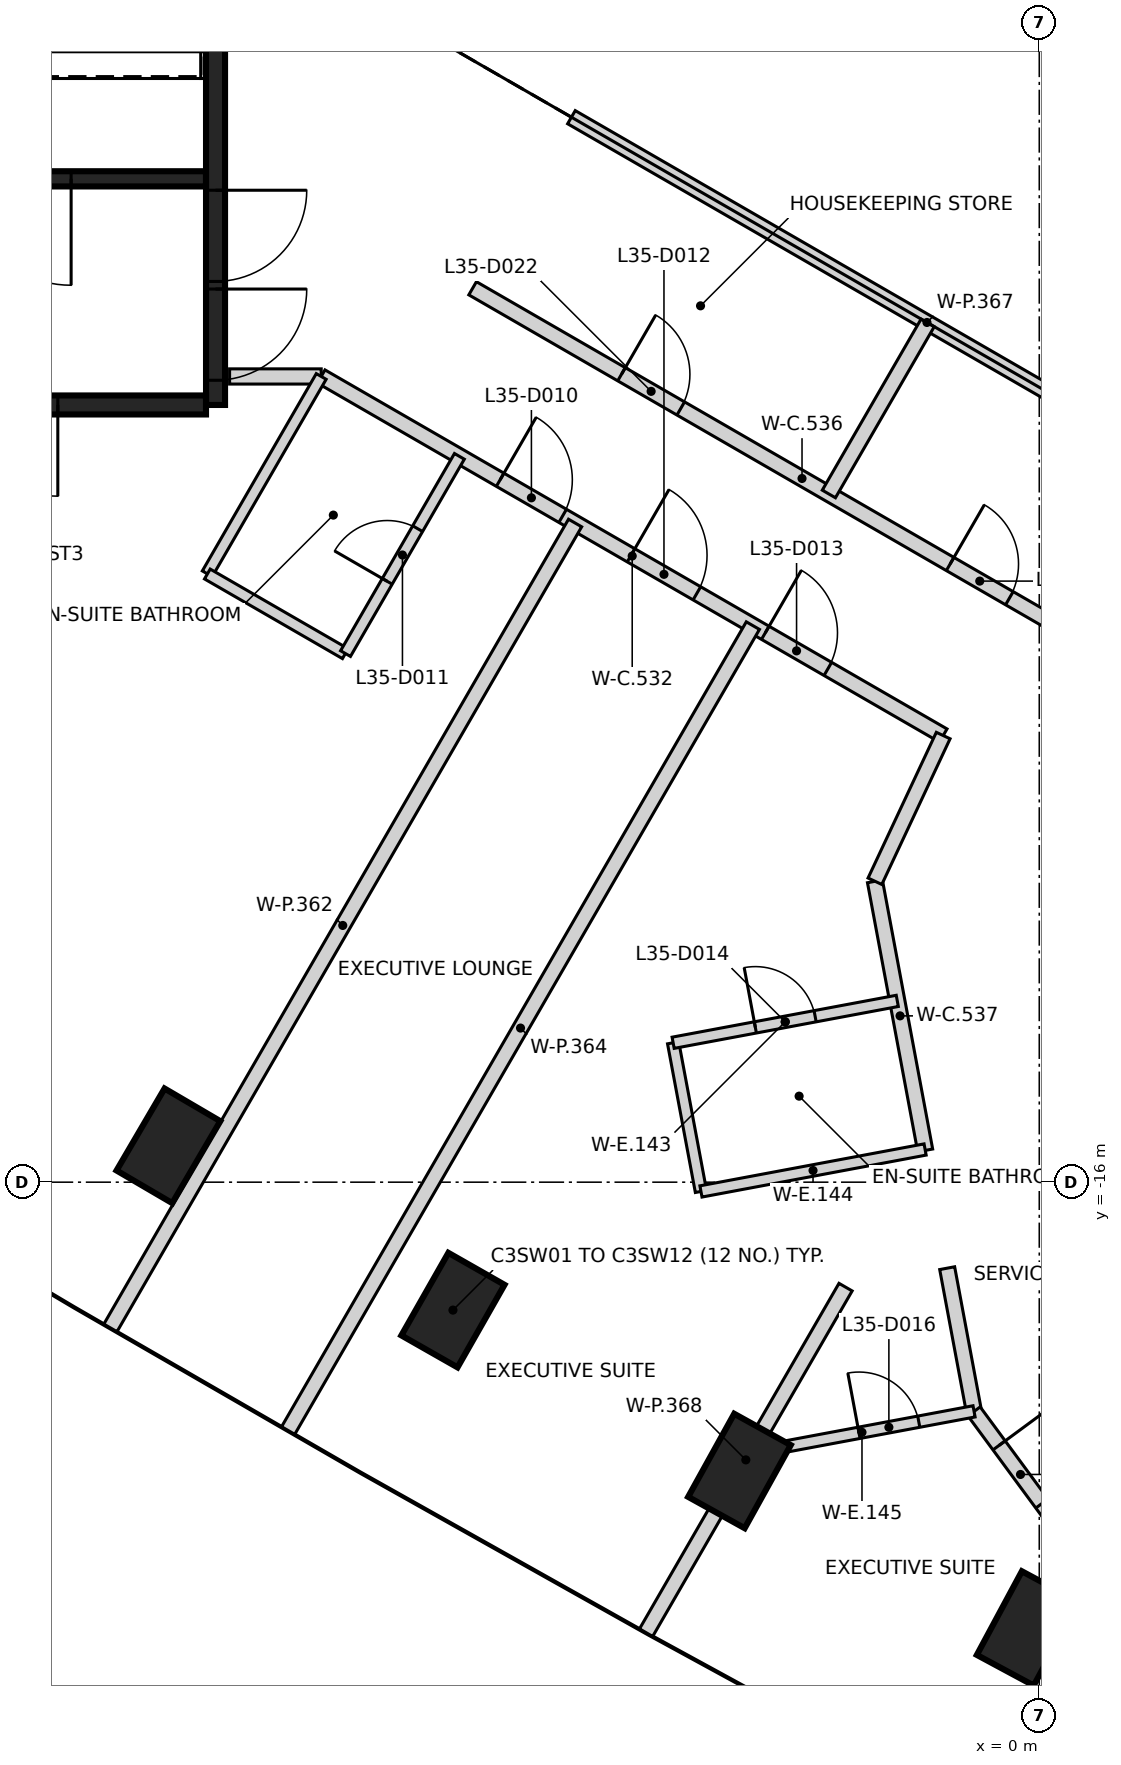
"""IFC4 building model, lengths in metres.
Left out: names, types, materials, properties, quantities, classifications, styles, units other than length and angle.
Written with IfcOpenShell. Run it as: python <this file> out.ifc"""

import sys

from ifc_helpers import new_model, si_unit, direction, frame, frame_2d, origin, origin_2d, place, context, subcontext, project, spatial, rectangle, extrude, element, fill, save


model = new_model("IFC4")
c1 = context("Model", 3, precision=1e-05, world=origin(), true_north=direction((0.0, 1.0)))
c2 = subcontext(c1, "Body", "Model", "MODEL_VIEW")
j1 = project(units=[si_unit("LENGTHUNIT", "METRE"), si_unit("PLANEANGLEUNIT", "RADIAN")], contexts=[c1])
p1 = place(None, origin())
s1 = spatial("IfcSite", under=j1, at=p1, CompositionType="ELEMENT")
p2 = place(p1, origin())
s2 = spatial("IfcBuilding", under=s1, at=p2, CompositionType="ELEMENT")
p3 = place(p2, frame((0.0, 0.0, 143.2)))
s3 = spatial("IfcBuildingStorey", under=s2, at=p3, CompositionType="ELEMENT", Elevation=143.2)
for number, where, z_axis, x_axis in (
    (1, (-11.457, -15.522, -0.4), (0.0, 0.0, 1.0), (0.505, 0.863, 0.0)),
    (2, (-7.714, -17.683, -0.4), (0.0, 0.0, 1.0), (0.495, 0.869, 0.0)),
    (3, (-3.945, -19.8, -0.4), (0.0, 0.0, 1.0), (0.485, 0.875, 0.0)),
    (4, (-0.151, -21.871, -0.4), (0.0, 0.0, 1.0), (0.474, 0.881, 0.0)),
):
    element("IfcColumn", number, at=place(p3, frame(where, z_axis=z_axis, x_axis=x_axis)), inside=s3, PredefinedType="COLUMN", context=c2, shape_type="SweptSolid", body=[
        extrude(rectangle(XDim=1.25, YDim=0.85, at=origin_2d()), origin(), (0.0, 0.0, 1.0), 3.6),
    ])
p4 = place(p3, frame((-10.837, 5.775, 0.0), z_axis=(0.0, 0.0, 1.0), x_axis=(0.0, -1.0, 0.0)))
e5 = element("IfcWall", 5, at=p4, inside=s3, PredefinedType="SHEAR", context=c2, shape_type="SweptSolid", body=[
    extrude(rectangle(XDim=11.55, YDim=0.25, at=frame_2d((5.775, 0.0))), origin(), (0.0, 0.0, 1.0), 3.2),
])
p5 = place(p4, frame((10.025, 0.0, 0.0)))
e6 = element("IfcOpeningElement", 6, at=p5, cuts=e5, PredefinedType="OPENING", context=c2, shape_type="SweptSolid", body=[
    extrude(rectangle(XDim=1.2, YDim=2.1, at=frame_2d((0.6, 1.05))), frame((0.0, 0.135, 0.0), z_axis=(0.0, -1.0, 0.0), x_axis=(1.0, 0.0, 0.0)), (0.0, 0.0, 1.0), 0.27),
])
p6 = place(p4, frame((8.725, 0.0, 0.0)))
e7 = element("IfcOpeningElement", 7, at=p6, cuts=e5, PredefinedType="OPENING", context=c2, shape_type="SweptSolid", body=[
    extrude(rectangle(XDim=1.2, YDim=2.1, at=frame_2d((0.6, 1.05))), frame((0.0, 0.135, 0.0), z_axis=(0.0, -1.0, 0.0), x_axis=(1.0, 0.0, 0.0)), (0.0, 0.0, 1.0), 0.27),
])
p7 = place(p3, frame((-10.963, -5.775, 0.0), z_axis=(0.0, 0.0, 1.0), x_axis=(-1.0, 0.0, 0.0)))
e8 = element("IfcWall", 8, at=p7, inside=s3, PredefinedType="SHEAR", context=c2, shape_type="SweptSolid", body=[
    extrude(rectangle(XDim=5.225, YDim=0.25, at=frame_2d((2.612, 0.0))), origin(), (0.0, 0.0, 1.0), 3.2),
])
p8 = place(p7, frame((1.95, 0.0, 0.0)))
e9 = element("IfcOpeningElement", 9, at=p8, cuts=e8, PredefinedType="OPENING", context=c2, shape_type="SweptSolid", body=[
    extrude(rectangle(XDim=1.2, YDim=2.1, at=frame_2d((0.6, 1.05))), frame((0.0, 0.135, 0.0), z_axis=(0.0, -1.0, 0.0), x_axis=(1.0, 0.0, 0.0)), (0.0, 0.0, 1.0), 0.27),
])
p9 = place(p3, frame((-10.963, -2.8, 0.0), z_axis=(0.0, 0.0, 1.0), x_axis=(-1.0, 0.0, 0.0)))
e10 = element("IfcWall", 10, at=p9, inside=s3, PredefinedType="SHEAR", context=c2, shape_type="SweptSolid", body=[
    extrude(rectangle(XDim=5.098, YDim=0.2, at=frame_2d((2.549, 0.0))), origin(), (0.0, 0.0, 1.0), 3.2),
])
p10 = place(p9, frame((1.774, 0.0, 0.0)))
e11 = element("IfcOpeningElement", 11, at=p10, cuts=e10, PredefinedType="OPENING", context=c2, shape_type="SweptSolid", body=[
    extrude(rectangle(XDim=1.4, YDim=2.1, at=frame_2d((0.7, 1.05))), frame((0.0, 0.11, 0.0), z_axis=(0.0, -1.0, 0.0), x_axis=(1.0, 0.0, 0.0)), (0.0, 0.0, 1.0), 0.22),
])
p11 = place(p3, frame((-10.652, -5.4, 0.0), z_axis=(0.0, 0.0, 1.0), x_axis=(1.0, 0.0, 0.0)))
e12 = element("IfcWall", 12, at=p11, inside=s3, PredefinedType="PARTITIONING", context=c2, shape_type="SweptSolid", body=[
    extrude(rectangle(XDim=1.205, YDim=0.2, at=frame_2d((0.603, 0.0))), origin(), (0.0, 0.0, 1.0), 3.2),
])
p12 = place(p3, frame((-9.447, -5.4, 0.0), z_axis=(0.0, 0.0, 1.0), x_axis=(0.866101262146, -0.49986858644, 0.0)))
e13 = element("IfcWall", 13, at=p12, inside=s3, PredefinedType="PARTITIONING", context=c2, shape_type="SweptSolid", body=[
    extrude(rectangle(XDim=9.449, YDim=0.2, at=frame_2d((4.724, 0.0))), origin(), (0.0, 0.0, 1.0), 3.2),
])
p13 = place(p12, frame((2.718, 0.0, 0.0)))
e14 = element("IfcOpeningElement", 14, at=p13, cuts=e13, PredefinedType="OPENING", context=c2, shape_type="SweptSolid", body=[
    extrude(rectangle(XDim=0.95, YDim=2.1, at=frame_2d((0.475, 1.05))), frame((0.0, 0.11, 0.0), z_axis=(0.0, -1.0, 0.0), x_axis=(1.0, 0.0, 0.0)), (0.0, 0.0, 1.0), 0.22),
])
p14 = place(p12, frame((4.707, 0.0, 0.0)))
e15 = element("IfcOpeningElement", 15, at=p14, cuts=e13, PredefinedType="OPENING", context=c2, shape_type="SweptSolid", body=[
    extrude(rectangle(XDim=1.0, YDim=2.1, at=frame_2d((0.5, 1.05))), frame((0.0, 0.11, 0.0), z_axis=(0.0, -1.0, 0.0), x_axis=(1.0, 0.0, 0.0)), (0.0, 0.0, 1.0), 0.22),
])
p15 = place(p12, frame((6.746, 0.0, 0.0)))
e16 = element("IfcOpeningElement", 16, at=p15, cuts=e13, PredefinedType="OPENING", context=c2, shape_type="SweptSolid", body=[
    extrude(rectangle(XDim=0.95, YDim=2.1, at=frame_2d((0.475, 1.05))), frame((0.0, 0.11, 0.0), z_axis=(0.0, -1.0, 0.0), x_axis=(1.0, 0.0, 0.0)), (0.0, 0.0, 1.0), 0.22),
])
p16 = place(p3, frame((-7.455, -4.24, 0.0), z_axis=(0.0, 0.0, 1.0), x_axis=(0.866015783746, -0.500016662025, 0.0)))
e17 = element("IfcWall", 17, at=p16, inside=s3, PredefinedType="PARTITIONING", context=c2, shape_type="SweptSolid", body=[
    extrude(rectangle(XDim=10.009, YDim=0.2, at=frame_2d((5.004, 0.0))), origin(), (0.0, 0.0, 1.0), 3.2),
])
p17 = place(p16, frame((2.262, 0.0, 0.0)))
e18 = element("IfcOpeningElement", 18, at=p17, cuts=e17, PredefinedType="OPENING", context=c2, shape_type="SweptSolid", body=[
    extrude(rectangle(XDim=0.9, YDim=2.1, at=frame_2d((0.45, 1.05))), frame((0.0, 0.11, 0.0), z_axis=(0.0, -1.0, 0.0), x_axis=(1.0, 0.0, 0.0)), (0.0, 0.0, 1.0), 0.22),
])
p18 = place(p16, frame((7.254, 0.0, 0.0)))
e19 = element("IfcOpeningElement", 19, at=p18, cuts=e17, PredefinedType="OPENING", context=c2, shape_type="SweptSolid", body=[
    extrude(rectangle(XDim=0.9, YDim=2.1, at=frame_2d((0.45, 1.05))), frame((0.0, 0.11, 0.0), z_axis=(0.0, -1.0, 0.0), x_axis=(1.0, 0.0, 0.0)), (0.0, 0.0, 1.0), 0.22),
])
p19 = place(p3, frame((-2.162, -12.042, 0.0), z_axis=(0.0, 0.0, 1.0), x_axis=(0.183572226488, -0.983006224631, 0.0)))
e20 = element("IfcWall", 20, at=p19, inside=s3, PredefinedType="PARTITIONING", context=c2, shape_type="SweptSolid", body=[
    extrude(rectangle(XDim=3.602, YDim=0.2, at=frame_2d((1.801, 0.0))), origin(), (0.0, 0.0, 1.0), 3.2),
])
p20 = place(p3, frame((-2.162, -12.041, 0.0), z_axis=(0.0, 0.0, 1.0), x_axis=(0.424280226728, 0.905530943264, 0.0)))
e21 = element("IfcWall", 21, at=p20, inside=s3, PredefinedType="PARTITIONING", context=c2, shape_type="SweptSolid", body=[
    extrude(rectangle(XDim=2.117, YDim=0.2, at=frame_2d((1.059, 0.0))), origin(), (0.0, 0.0, 1.0), 3.2),
])
p21 = place(p3, frame((-1.212, -17.131, 0.0), z_axis=(0.0, 0.0, 1.0), x_axis=(0.183680924698, -0.982985919483, 0.0)))
e22 = element("IfcWall", 22, at=p21, inside=s3, PredefinedType="PARTITIONING", context=c2, shape_type="SweptSolid", body=[
    extrude(rectangle(XDim=1.917, YDim=0.2, at=frame_2d((0.958, 0.0))), origin(), (0.0, 0.0, 1.0), 3.2),
])
p22 = place(p3, frame((-0.858, -19.016, 0.0), z_axis=(0.0, 0.0, 1.0), x_axis=(0.593123867414, -0.805111220829, 0.0)))
e23 = element("IfcWall", 23, at=p22, inside=s3, PredefinedType="PARTITIONING", context=c2, shape_type="SweptSolid", body=[
    extrude(rectangle(XDim=2.77, YDim=0.2, at=frame_2d((1.385, 0.0))), origin(), (0.0, 0.0, 1.0), 3.2),
])
p23 = place(p22, frame((0.555, 0.0, 0.0)))
e24 = element("IfcOpeningElement", 24, at=p23, cuts=e23, PredefinedType="OPENING", context=c2, shape_type="SweptSolid", body=[
    extrude(rectangle(XDim=0.95, YDim=2.1, at=frame_2d((0.475, 1.05))), frame((0.0, 0.11, 0.0), z_axis=(0.0, -1.0, 0.0), x_axis=(1.0, 0.0, 0.0)), (0.0, 0.0, 1.0), 0.22),
])
p24 = place(p3, frame((-12.22, -17.917, 0.0), z_axis=(0.0, 0.0, 1.0), x_axis=(0.499963860175, 0.866046268117, 0.0)))
e25 = element("IfcWall", 25, at=p24, inside=s3, PredefinedType="PARTITIONING", context=c2, shape_type="SweptSolid", body=[
    extrude(rectangle(XDim=12.227, YDim=0.2, at=frame_2d((6.114, 0.0))), origin(), (0.0, 0.0, 1.0), 2.3),
])
p25 = place(p3, frame((-9.882, -19.267, 0.0), z_axis=(0.0, 0.0, 1.0), x_axis=(0.499993811829, 0.866028976497, 0.0)))
e26 = element("IfcWall", 26, at=p25, inside=s3, PredefinedType="PARTITIONING", context=c2, shape_type="SweptSolid", body=[
    extrude(rectangle(XDim=12.227, YDim=0.2, at=frame_2d((6.114, 0.0))), origin(), (0.0, 0.0, 1.0), 2.3),
])
p26 = place(p3, frame((-6.155, -1.989, 0.0), z_axis=(0.0, 0.0, 1.0), x_axis=(0.866009062299, -0.500028303215, 0.0)))
e27 = element("IfcWall", 27, at=p26, inside=s3, PredefinedType="PARTITIONING", context=c2, shape_type="SweptSolid", body=[
    extrude(rectangle(XDim=10.802, YDim=0.2, at=frame_2d((5.401, 0.0))), origin(), (0.0, 0.0, 1.0), 2.3),
])
p27 = place(p3, frame((-5.173, -21.926, 0.0), z_axis=(0.0, 0.0, 1.0), x_axis=(0.499941227542, 0.86605933342, 0.0)))
e28 = element("IfcWall", 28, at=p27, inside=s3, PredefinedType="PARTITIONING", context=c2, shape_type="SweptSolid", body=[
    extrude(rectangle(XDim=5.249, YDim=0.2, at=frame_2d((2.625, 0.0))), origin(), (0.0, 0.0, 1.0), 3.2),
])
p28 = place(p3, frame((-2.768, -6.946, 0.0), z_axis=(0.0, 0.0, 1.0), x_axis=(0.500017832597, 0.866015107885, 0.0)))
e29 = element("IfcWall", 29, at=p28, inside=s3, PredefinedType="PARTITIONING", context=c2, shape_type="SweptSolid", body=[
    extrude(rectangle(XDim=2.6, YDim=0.2, at=frame_2d((1.3, 0.0))), origin(), (0.0, 0.0, 1.0), 2.3),
])
p29 = place(p3, frame((-0.425, -24.505, 0.0), z_axis=(0.0, 0.0, 1.0), x_axis=(0.499915194772, 0.86607436057, 0.0)))
e30 = element("IfcWall", 30, at=p29, inside=s3, PredefinedType="PARTITIONING", context=c2, shape_type="SweptSolid", body=[
    extrude(rectangle(XDim=2.997, YDim=0.2, at=frame_2d((1.499, 0.0))), origin(), (0.0, 0.0, 1.0), 2.3),
])
p30 = place(p3, frame((-10.946, -7.996, 0.0), z_axis=(0.0, 0.0, 1.0), x_axis=(0.500027927039, 0.866009279501, 0.0)))
e31 = element("IfcWall", 31, at=p30, inside=s3, PredefinedType="PARTITIONING", context=c2, shape_type="SweptSolid", body=[
    extrude(rectangle(XDim=2.998, YDim=0.15, at=frame_2d((1.499, 0.0))), origin(), (0.0, 0.0, 1.0), 3.2),
])
p31 = place(p3, frame((-10.945, -7.999, 0.0), z_axis=(0.0, 0.0, 1.0), x_axis=(0.866005190944, -0.500035008033, 0.0)))
e32 = element("IfcWall", 32, at=p31, inside=s3, PredefinedType="PARTITIONING", context=c2, shape_type="SweptSolid", body=[
    extrude(rectangle(XDim=2.096, YDim=0.15, at=frame_2d((1.048, 0.0))), origin(), (0.0, 0.0, 1.0), 3.2),
])
p32 = place(p3, frame((-9.127, -9.046, 0.0), z_axis=(0.0, 0.0, 1.0), x_axis=(0.499959910729, 0.866048548099, 0.0)))
e33 = element("IfcWall", 33, at=p32, inside=s3, PredefinedType="PARTITIONING", context=c2, shape_type="SweptSolid", body=[
    extrude(rectangle(XDim=2.996, YDim=0.15, at=frame_2d((1.498, 0.0))), origin(), (0.0, 0.0, 1.0), 3.2),
])
p33 = place(p32, frame((1.098, 0.0, 0.0)))
e34 = element("IfcOpeningElement", 34, at=p33, cuts=e33, PredefinedType="OPENING", context=c2, shape_type="SweptSolid", body=[
    extrude(rectangle(XDim=0.8, YDim=2.1, at=frame_2d((0.4, 1.05))), frame((0.0, 0.085, 0.0), z_axis=(0.0, -1.0, 0.0), x_axis=(1.0, 0.0, 0.0)), (0.0, 0.0, 1.0), 0.17),
])
p34 = place(p3, frame((-4.817, -14.166, 0.0), z_axis=(0.0, 0.0, 1.0), x_axis=(0.183903339385, -0.982944332993, 0.0)))
e35 = element("IfcWall", 35, at=p34, inside=s3, PredefinedType="PARTITIONING", context=c2, shape_type="SweptSolid", body=[
    extrude(rectangle(XDim=1.99, YDim=0.15, at=frame_2d((0.995, 0.0))), origin(), (0.0, 0.0, 1.0), 3.2),
])
p35 = place(p3, frame((-4.817, -14.166, 0.0), z_axis=(0.0, 0.0, 1.0), x_axis=(0.982987155193, 0.183674311555, 0.0)))
e36 = element("IfcWall", 36, at=p35, inside=s3, PredefinedType="PARTITIONING", context=c2, shape_type="SweptSolid", body=[
    extrude(rectangle(XDim=3.0, YDim=0.15, at=frame_2d((1.5, 0.0))), origin(), (0.0, 0.0, 1.0), 3.2),
])
p36 = place(p35, frame((1.1, 0.0, 0.0)))
e37 = element("IfcOpeningElement", 37, at=p36, cuts=e36, PredefinedType="OPENING", context=c2, shape_type="SweptSolid", body=[
    extrude(rectangle(XDim=0.8, YDim=2.1, at=frame_2d((0.4, 1.05))), frame((0.0, 0.085, 0.0), z_axis=(0.0, -1.0, 0.0), x_axis=(1.0, 0.0, 0.0)), (0.0, 0.0, 1.0), 0.17),
])
p37 = place(p3, frame((-4.451, -16.122, 0.0), z_axis=(0.0, 0.0, 1.0), x_axis=(0.982928336035, 0.18398882091, 0.0)))
e38 = element("IfcWall", 38, at=p37, inside=s3, PredefinedType="PARTITIONING", context=c2, shape_type="SweptSolid", body=[
    extrude(rectangle(XDim=3.0, YDim=0.15, at=frame_2d((1.5, 0.0))), origin(), (0.0, 0.0, 1.0), 3.2),
])
p38 = place(p3, frame((-3.807, -19.566, 0.0), z_axis=(0.0, 0.0, 1.0), x_axis=(0.982987155193, 0.183674311555, 0.0)))
e39 = element("IfcWall", 39, at=p38, inside=s3, PredefinedType="PARTITIONING", context=c2, shape_type="SweptSolid", body=[
    extrude(rectangle(XDim=3.0, YDim=0.15, at=frame_2d((1.5, 0.0))), origin(), (0.0, 0.0, 1.0), 3.2),
])
p39 = place(p38, frame((1.46, 0.0, 0.0)))
e40 = element("IfcOpeningElement", 40, at=p39, cuts=e39, PredefinedType="OPENING", context=c2, shape_type="SweptSolid", body=[
    extrude(rectangle(XDim=0.8, YDim=2.1, at=frame_2d((0.4, 1.05))), frame((0.0, 0.085, 0.0), z_axis=(0.0, -1.0, 0.0), x_axis=(1.0, 0.0, 0.0)), (0.0, 0.0, 1.0), 0.17),
])
p40 = place(p5, origin())
e41 = element("IfcDoor", 41, at=p40, inside=s3, OperationType="SINGLE_SWING_LEFT", PredefinedType="DOOR", context=c2, shape_type="SweptSolid", body=[
    extrude(rectangle(XDim=1.2, YDim=2.1, at=frame_2d((0.6, 1.05))), frame((0.0, 0.025, 0.0), z_axis=(0.0, -1.0, 0.0), x_axis=(1.0, 0.0, 0.0)), (0.0, 0.0, 1.0), 0.05),
])
fill(e6, e41)
p41 = place(p6, origin())
e42 = element("IfcDoor", 42, at=p41, inside=s3, OperationType="SINGLE_SWING_RIGHT", PredefinedType="DOOR", context=c2, shape_type="SweptSolid", body=[
    extrude(rectangle(XDim=1.2, YDim=2.1, at=frame_2d((0.6, 1.05))), frame((0.0, 0.025, 0.0), z_axis=(0.0, -1.0, 0.0), x_axis=(1.0, 0.0, 0.0)), (0.0, 0.0, 1.0), 0.05),
])
fill(e7, e42)
p42 = place(p10, origin())
e43 = element("IfcDoor", 43, at=p42, inside=s3, OperationType="SINGLE_SWING_LEFT", PredefinedType="DOOR", context=c2, shape_type="SweptSolid", body=[
    extrude(rectangle(XDim=1.4, YDim=2.1, at=frame_2d((0.7, 1.05))), frame((0.0, 0.025, 0.0), z_axis=(0.0, -1.0, 0.0), x_axis=(1.0, 0.0, 0.0)), (0.0, 0.0, 1.0), 0.05),
])
fill(e11, e43)
p43 = place(p8, origin())
e44 = element("IfcDoor", 44, at=p43, inside=s3, OperationType="SINGLE_SWING_RIGHT", PredefinedType="DOOR", context=c2, shape_type="SweptSolid", body=[
    extrude(rectangle(XDim=1.2, YDim=2.1, at=frame_2d((0.6, 1.05))), frame((0.0, 0.025, 0.0), z_axis=(0.0, -1.0, 0.0), x_axis=(1.0, 0.0, 0.0)), (0.0, 0.0, 1.0), 0.05),
])
fill(e9, e44)
p44 = place(p13, frame((0.95, 0.0, 0.0), z_axis=(0.0, 0.0, 1.0), x_axis=(-1.0, 0.0, 0.0)))
e45 = element("IfcDoor", 45, at=p44, inside=s3, OperationType="SINGLE_SWING_LEFT", PredefinedType="DOOR", context=c2, shape_type="SweptSolid", body=[
    extrude(rectangle(XDim=0.95, YDim=2.1, at=frame_2d((0.475, 1.05))), frame((0.0, 0.025, 0.0), z_axis=(0.0, -1.0, 0.0), x_axis=(1.0, 0.0, 0.0)), (0.0, 0.0, 1.0), 0.05),
])
fill(e14, e45)
p45 = place(p33, origin())
e46 = element("IfcDoor", 46, at=p45, inside=s3, OperationType="SINGLE_SWING_LEFT", PredefinedType="DOOR", context=c2, shape_type="SweptSolid", body=[
    extrude(rectangle(XDim=0.8, YDim=2.1, at=frame_2d((0.4, 1.05))), frame((0.0, 0.025, 0.0), z_axis=(0.0, -1.0, 0.0), x_axis=(1.0, 0.0, 0.0)), (0.0, 0.0, 1.0), 0.05),
])
fill(e34, e46)
p46 = place(p14, frame((1.0, 0.0, 0.0), z_axis=(0.0, 0.0, 1.0), x_axis=(-1.0, 0.0, 0.0)))
e47 = element("IfcDoor", 47, at=p46, inside=s3, OperationType="SINGLE_SWING_LEFT", PredefinedType="DOOR", context=c2, shape_type="SweptSolid", body=[
    extrude(rectangle(XDim=1.0, YDim=2.1, at=frame_2d((0.5, 1.05))), frame((0.0, 0.025, 0.0), z_axis=(0.0, -1.0, 0.0), x_axis=(1.0, 0.0, 0.0)), (0.0, 0.0, 1.0), 0.05),
])
fill(e15, e47)
p47 = place(p15, frame((0.95, 0.0, 0.0), z_axis=(0.0, 0.0, 1.0), x_axis=(-1.0, 0.0, 0.0)))
e48 = element("IfcDoor", 48, at=p47, inside=s3, OperationType="SINGLE_SWING_LEFT", PredefinedType="DOOR", context=c2, shape_type="SweptSolid", body=[
    extrude(rectangle(XDim=0.95, YDim=2.1, at=frame_2d((0.475, 1.05))), frame((0.0, 0.025, 0.0), z_axis=(0.0, -1.0, 0.0), x_axis=(1.0, 0.0, 0.0)), (0.0, 0.0, 1.0), 0.05),
])
fill(e16, e48)
p48 = place(p36, frame((0.8, 0.0, 0.0), z_axis=(0.0, 0.0, 1.0), x_axis=(-1.0, 0.0, 0.0)))
e49 = element("IfcDoor", 49, at=p48, inside=s3, OperationType="SINGLE_SWING_LEFT", PredefinedType="DOOR", context=c2, shape_type="SweptSolid", body=[
    extrude(rectangle(XDim=0.8, YDim=2.1, at=frame_2d((0.4, 1.05))), frame((0.0, 0.025, 0.0), z_axis=(0.0, -1.0, 0.0), x_axis=(1.0, 0.0, 0.0)), (0.0, 0.0, 1.0), 0.05),
])
fill(e37, e49)
p49 = place(p23, frame((0.95, 0.0, 0.0), z_axis=(0.0, 0.0, 1.0), x_axis=(-1.0, 0.0, 0.0)))
e50 = element("IfcDoor", 50, at=p49, inside=s3, OperationType="SINGLE_SWING_LEFT", PredefinedType="DOOR", context=c2, shape_type="SweptSolid", body=[
    extrude(rectangle(XDim=0.95, YDim=2.1, at=frame_2d((0.475, 1.05))), frame((0.0, 0.025, 0.0), z_axis=(0.0, -1.0, 0.0), x_axis=(1.0, 0.0, 0.0)), (0.0, 0.0, 1.0), 0.05),
])
fill(e24, e50)
p50 = place(p39, frame((0.8, 0.0, 0.0), z_axis=(0.0, 0.0, 1.0), x_axis=(-1.0, 0.0, 0.0)))
e51 = element("IfcDoor", 51, at=p50, inside=s3, OperationType="SINGLE_SWING_LEFT", PredefinedType="DOOR", context=c2, shape_type="SweptSolid", body=[
    extrude(rectangle(XDim=0.8, YDim=2.1, at=frame_2d((0.4, 1.05))), frame((0.0, 0.025, 0.0), z_axis=(0.0, -1.0, 0.0), x_axis=(1.0, 0.0, 0.0)), (0.0, 0.0, 1.0), 0.05),
])
fill(e40, e51)
p51 = place(p17, origin())
e52 = element("IfcDoor", 52, at=p51, inside=s3, OperationType="SINGLE_SWING_LEFT", PredefinedType="DOOR", context=c2, shape_type="SweptSolid", body=[
    extrude(rectangle(XDim=0.9, YDim=2.1, at=frame_2d((0.45, 1.05))), frame((0.0, 0.025, 0.0), z_axis=(0.0, -1.0, 0.0), x_axis=(1.0, 0.0, 0.0)), (0.0, 0.0, 1.0), 0.05),
])
fill(e18, e52)
p52 = place(p18, origin())
e53 = element("IfcDoor", 53, at=p52, inside=s3, OperationType="SINGLE_SWING_LEFT", PredefinedType="DOOR", context=c2, shape_type="SweptSolid", body=[
    extrude(rectangle(XDim=0.9, YDim=2.1, at=frame_2d((0.45, 1.05))), frame((0.0, 0.025, 0.0), z_axis=(0.0, -1.0, 0.0), x_axis=(1.0, 0.0, 0.0)), (0.0, 0.0, 1.0), 0.05),
])
fill(e19, e53)
save(model, sys.argv[1])
